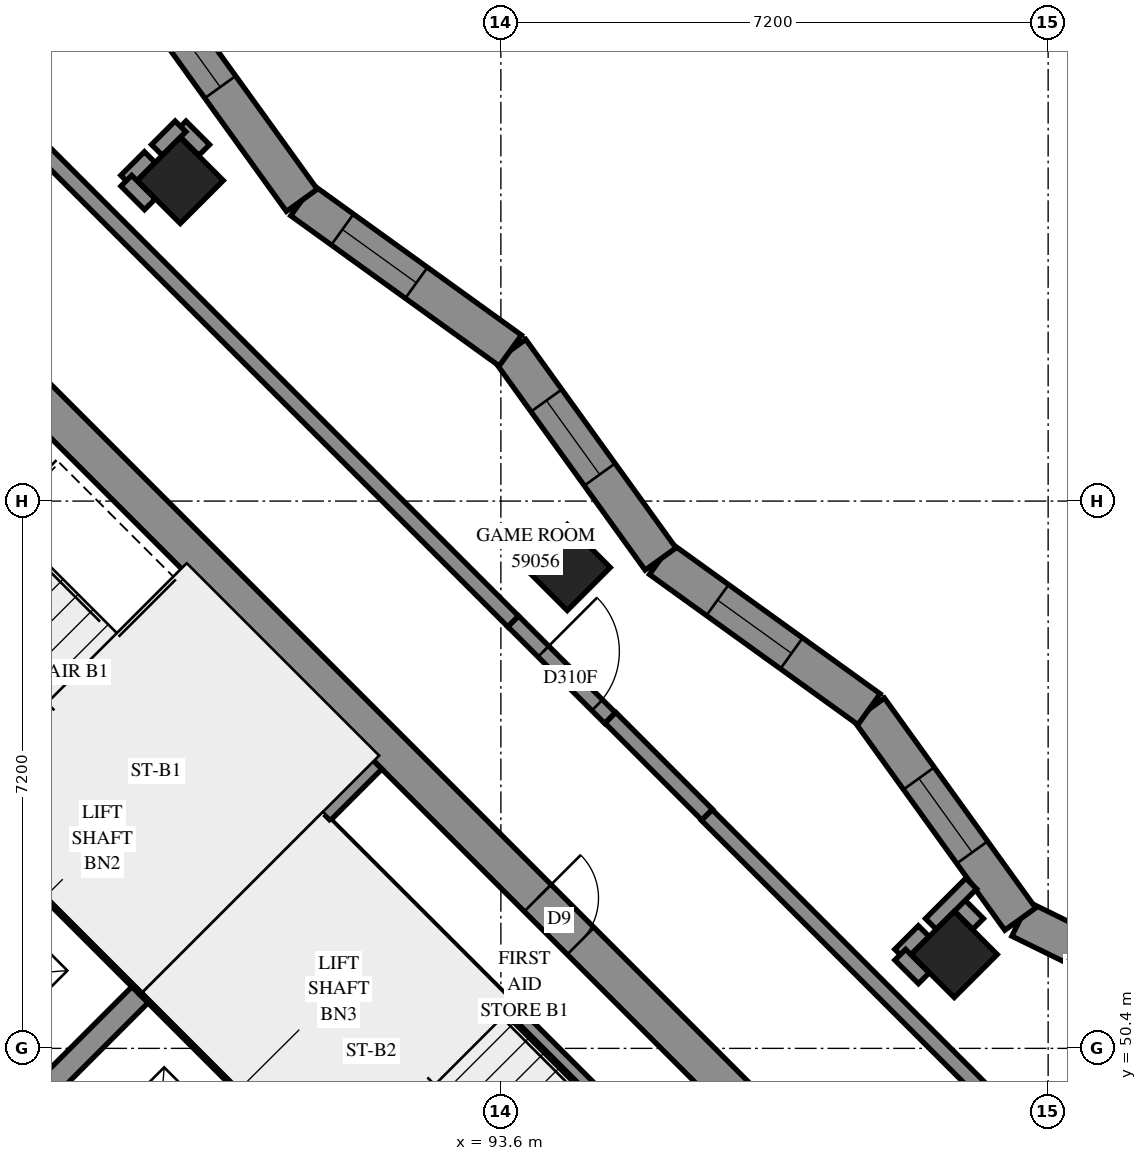
"""IFC4 building model, lengths in metres.
Left out: names, types, materials, properties, quantities, classifications, styles, units other than length and angle.
Written with IfcOpenShell. Run it as: python <this file> out.ifc"""

import sys

from ifc_helpers import new_model, si_unit, direction, frame, frame_2d, origin, origin_2d, place, context, subcontext, project, spatial, polyline, rectangle, outline, extrude, element, fill, save


model = new_model("IFC4")
c1 = context("Model", 3, precision=1e-05, world=origin(), true_north=direction((0.0, 1.0)))
c2 = subcontext(c1, "Body", "Model", "MODEL_VIEW")
j1 = project(units=[si_unit("LENGTHUNIT", "METRE"), si_unit("PLANEANGLEUNIT", "RADIAN")], contexts=[c1])
p1 = place(None, origin())
s1 = spatial("IfcSite", under=j1, at=p1, CompositionType="ELEMENT")
p2 = place(p1, origin())
s2 = spatial("IfcBuilding", under=s1, at=p2, CompositionType="ELEMENT")
p3 = place(p2, frame((0.0, 0.0, 216.8)))
s3 = spatial("IfcBuildingStorey", under=s2, at=p3, CompositionType="ELEMENT", Elevation=216.8)
for number, where, z_axis, x_axis in (
    (1, (89.382, 61.818, 0.0), (0.0, 0.0, 1.0), (0.707, -0.707, 0.0)),
    (2, (94.474, 56.727, 0.0), (0.0, 0.0, 1.0), (0.707, -0.707, 0.0)),
    (3, (99.565, 51.635, 0.0), (0.0, 0.0, 1.0), (0.707, -0.707, 0.0)),
):
    element("IfcColumn", number, at=place(p3, frame(where, z_axis=z_axis, x_axis=x_axis)), inside=s3, PredefinedType="COLUMN", context=c2, shape_type="SweptSolid", body=[
        extrude(rectangle(XDim=0.8, YDim=0.8, at=origin_2d()), origin(), (0.0, 0.0, 1.0), 3.1),
    ])
p4 = place(p3, frame((86.66, 59.802, -0.3), z_axis=(0.0, 0.0, 1.0), x_axis=(0.7071067812, -0.7071067812, 0.0)))
e4 = element("IfcWall", 4, at=p4, inside=s3, PredefinedType="SHEAR", context=c2, shape_type="SweptSolid", body=[
    extrude(rectangle(XDim=15.4, YDim=0.5, at=frame_2d((7.7, 0.0))), origin(), (0.0, 0.0, 1.0), 2.7),
])
p5 = place(p4, frame((10.5, 0.0, 0.3)))
e5 = element("IfcOpeningElement", 5, at=p5, cuts=e4, PredefinedType="OPENING", context=c2, shape_type="SweptSolid", body=[
    extrude(rectangle(XDim=0.8, YDim=2.1, at=frame_2d((0.4, 1.05))), frame((0.0, 0.26, 0.0), z_axis=(0.0, -1.0, 0.0), x_axis=(1.0, 0.0, 0.0)), (0.0, 0.0, 1.0), 0.52),
])
p6 = place(p3, frame((86.625, 48.878, 0.0), z_axis=(0.0, 0.0, 1.0), x_axis=(0.7071067812, 0.7071067812, 0.0)))
e6 = element("IfcWall", 6, at=p6, inside=s3, PredefinedType="SOLIDWALL", context=c2, shape_type="SweptSolid", body=[
    extrude(rectangle(XDim=3.3, YDim=0.3, at=frame_2d((1.65, 0.0))), origin(), (0.0, 0.0, 1.0), 3.1),
])
p7 = place(p3, frame((78.988, 51.423, 0.0), z_axis=(0.0, 0.0, 1.0), x_axis=(0.7071067812, -0.7071067812, 0.0)))
e7 = element("IfcWall", 7, at=p7, inside=s3, PredefinedType="SOLIDWALL", context=c2, shape_type="SweptSolid", body=[
    extrude(rectangle(XDim=14.4, YDim=0.3, at=frame_2d((7.2, 0.0))), origin(), (0.0, 0.0, 1.0), 3.1),
])
p8 = place(p7, frame((1.35, 0.0, 0.0)))
e8 = element("IfcOpeningElement", 8, at=p8, cuts=e7, PredefinedType="OPENING", context=c2, shape_type="SweptSolid", body=[
    extrude(rectangle(XDim=0.9, YDim=2.1, at=frame_2d((0.45, 1.05))), frame((0.0, 0.16, 0.0), z_axis=(0.0, -1.0, 0.0), x_axis=(1.0, 0.0, 0.0)), (0.0, 0.0, 1.0), 0.32),
])
p9 = place(p7, frame((4.95, 0.0, 0.0)))
e9 = element("IfcOpeningElement", 9, at=p9, cuts=e7, PredefinedType="OPENING", context=c2, shape_type="SweptSolid", body=[
    extrude(rectangle(XDim=0.9, YDim=2.1, at=frame_2d((0.45, 1.05))), frame((0.0, 0.16, 0.0), z_axis=(0.0, -1.0, 0.0), x_axis=(1.0, 0.0, 0.0)), (0.0, 0.0, 1.0), 0.32),
])
p10 = place(p7, frame((8.55, 0.0, 0.0)))
e10 = element("IfcOpeningElement", 10, at=p10, cuts=e7, PredefinedType="OPENING", context=c2, shape_type="SweptSolid", body=[
    extrude(rectangle(XDim=0.9, YDim=2.1, at=frame_2d((0.45, 1.05))), frame((0.0, 0.16, 0.0), z_axis=(0.0, -1.0, 0.0), x_axis=(1.0, 0.0, 0.0)), (0.0, 0.0, 1.0), 0.32),
])
p11 = place(p7, frame((12.05, 0.0, 0.0)))
e11 = element("IfcOpeningElement", 11, at=p11, cuts=e7, PredefinedType="OPENING", context=c2, shape_type="SweptSolid", body=[
    extrude(rectangle(XDim=1.1, YDim=2.1, at=frame_2d((0.55, 1.05))), frame((0.0, 0.16, 0.0), z_axis=(0.0, -1.0, 0.0), x_axis=(1.0, 0.0, 0.0)), (0.0, 0.0, 1.0), 0.32),
])
p12 = place(p3, frame((81.534, 53.969, 0.0), z_axis=(0.0, 0.0, 1.0), x_axis=(0.707103309, -0.7071102534, 0.0)))
e12 = element("IfcWall", 12, at=p12, inside=s3, PredefinedType="SOLIDWALL", context=c2, shape_type="SweptSolid", body=[
    extrude(rectangle(XDim=14.4, YDim=0.3, at=frame_2d((7.2, 0.0))), origin(), (0.0, 0.0, 1.0), 3.1),
])
p13 = place(p12, frame((1.25, 0.0, 0.0)))
e13 = element("IfcOpeningElement", 13, at=p13, cuts=e12, PredefinedType="OPENING", context=c2, shape_type="SweptSolid", body=[
    extrude(rectangle(XDim=1.1, YDim=2.1, at=frame_2d((0.55, 1.05))), frame((0.0, 0.16, 0.0), z_axis=(0.0, -1.0, 0.0), x_axis=(1.0, 0.0, 0.0)), (0.0, 0.0, 1.0), 0.32),
])
p14 = place(p12, frame((4.85, 0.0, 0.0)))
e14 = element("IfcOpeningElement", 14, at=p14, cuts=e12, PredefinedType="OPENING", context=c2, shape_type="SweptSolid", body=[
    extrude(rectangle(XDim=1.1, YDim=2.1, at=frame_2d((0.55, 1.05))), frame((0.0, 0.16, 0.0), z_axis=(0.0, -1.0, 0.0), x_axis=(1.0, 0.0, 0.0)), (0.0, 0.0, 1.0), 0.32),
])
p15 = place(p12, frame((8.45, 0.0, 0.0)))
e15 = element("IfcOpeningElement", 15, at=p15, cuts=e12, PredefinedType="OPENING", context=c2, shape_type="SweptSolid", body=[
    extrude(rectangle(XDim=1.1, YDim=2.1, at=frame_2d((0.55, 1.05))), frame((0.0, 0.16, 0.0), z_axis=(0.0, -1.0, 0.0), x_axis=(1.0, 0.0, 0.0)), (0.0, 0.0, 1.0), 0.32),
])
p16 = place(p12, frame((12.05, 0.0, 0.0)))
e16 = element("IfcOpeningElement", 16, at=p16, cuts=e12, PredefinedType="OPENING", context=c2, shape_type="SweptSolid", body=[
    extrude(rectangle(XDim=1.1, YDim=2.1, at=frame_2d((0.55, 1.05))), frame((0.0, 0.16, 0.0), z_axis=(0.0, -1.0, 0.0), x_axis=(1.0, 0.0, 0.0)), (0.0, 0.0, 1.0), 0.32),
])
for number, where, z_axis, x_axis in (
    (17, (83.867, 56.302, 0.0), (0.0, 0.0, 1.0), (0.707, -0.707, 0.0)),
    (18, (88.958, 51.211, 0.0), (0.0, 0.0, 1.0), (0.707, -0.707, 0.0)),
):
    element("IfcWall", number, at=place(p3, frame(where, z_axis=z_axis, x_axis=x_axis)), inside=s3, PredefinedType="SOLIDWALL", context=c2, shape_type="SweptSolid", body=[
        extrude(rectangle(XDim=7.2, YDim=0.3, at=frame_2d((3.6, 0.0))), origin(), (0.0, 0.0, 1.0), 3.1),
    ])
p17 = place(p3, frame((88.958, 51.211, 0.0), z_axis=(0.0, 0.0, 1.0), x_axis=(0.7071067812, 0.7071067812, 0.0)))
e19 = element("IfcWall", 19, at=p17, inside=s3, PredefinedType="SOLIDWALL", context=c2, shape_type="SweptSolid", body=[
    extrude(rectangle(XDim=4.2, YDim=0.3, at=frame_2d((2.1, 0.0))), origin(), (0.0, 0.0, 1.0), 3.1),
])
p18 = place(p3, frame((99.211, 46.544, 0.0), z_axis=(0.0, 0.0, 1.0), x_axis=(0.7071067812, 0.7071067812, 0.0)))
e20 = element("IfcWall", 20, at=p18, inside=s3, PredefinedType="SOLIDWALL", context=c2, shape_type="SweptSolid", body=[
    extrude(outline(polyline([(0.25, -0.25), (6.192, -0.25), (5.492, 0.25), (-0.25, 0.25), (0.25, -0.25)])), origin(), (0.0, 0.0, 1.0), 3.1),
])
p19 = place(p18, frame((0.925, 0.0, 0.6)))
e21 = element("IfcOpeningElement", 21, at=p19, cuts=e20, PredefinedType="OPENING", context=c2, shape_type="SweptSolid", body=[
    extrude(rectangle(XDim=1.8, YDim=1.9, at=frame_2d((0.9, 0.95))), frame((0.0, 0.26, 0.0), z_axis=(0.0, -1.0, 0.0), x_axis=(1.0, 0.0, 0.0)), (0.0, 0.0, 1.0), 0.52),
])
p20 = place(p18, frame((3.971, 0.0, 0.6)))
e22 = element("IfcOpeningElement", 22, at=p20, cuts=e20, PredefinedType="OPENING", context=c2, shape_type="SweptSolid", body=[
    extrude(rectangle(XDim=1.2, YDim=1.9, at=frame_2d((0.6, 0.95))), frame((0.0, 0.26, 0.0), z_axis=(0.0, -1.0, 0.0), x_axis=(1.0, 0.0, 0.0)), (0.0, 0.0, 1.0), 0.52),
])
p21 = place(p3, frame((103.342, 50.675, 0.0), z_axis=(0.0, 0.0, 1.0), x_axis=(-0.8979728607, 0.4400508396, 0.0)))
e23 = element("IfcWall", 23, at=p21, inside=s3, PredefinedType="SOLIDWALL", context=c2, shape_type="SweptSolid", body=[
    extrude(outline(polyline([(-0.35, -0.25), (3.177, -0.25), (3.302, 0.25), (0.35, 0.25), (-0.35, -0.25)])), origin(), (0.0, 0.0, 1.0), 3.1),
])
p22 = place(p21, frame((1.195, 0.0, 0.45)))
e24 = element("IfcOpeningElement", 24, at=p22, cuts=e23, PredefinedType="OPENING", context=c2, shape_type="SweptSolid", body=[
    extrude(rectangle(XDim=1.2, YDim=2.5, at=frame_2d((0.6, 1.25))), frame((0.0, 0.26, 0.0), z_axis=(0.0, -1.0, 0.0), x_axis=(1.0, 0.0, 0.0)), (0.0, 0.0, 1.0), 0.52),
])
p23 = place(p3, frame((100.433, 52.101, 0.0), z_axis=(0.0, 0.0, 1.0), x_axis=(-0.5845942373, 0.8113258148, 0.0)))
e25 = element("IfcWall", 25, at=p23, inside=s3, PredefinedType="SOLIDWALL", context=c2, shape_type="SweptSolid", body=[
    extrude(outline(polyline([(0.063, -0.25), (3.443, -0.25), (3.362, 0.25), (-0.063, 0.25), (0.063, -0.25)])), origin(), (0.0, 0.0, 1.0), 3.1),
])
p24 = place(p23, frame((1.081, 0.0, 0.45)))
e26 = element("IfcOpeningElement", 26, at=p24, cuts=e25, PredefinedType="OPENING", context=c2, shape_type="SweptSolid", body=[
    extrude(rectangle(XDim=1.2, YDim=2.5, at=frame_2d((0.6, 1.25))), frame((0.0, 0.26, 0.0), z_axis=(0.0, -1.0, 0.0), x_axis=(1.0, 0.0, 0.0)), (0.0, 0.0, 1.0), 0.52),
])
p25 = place(p3, frame((98.444, 54.862, 0.0), z_axis=(0.0, 0.0, 1.0), x_axis=(-0.8113121077, 0.5846132601, 0.0)))
e27 = element("IfcWall", 27, at=p25, inside=s3, PredefinedType="SOLIDWALL", context=c2, shape_type="SweptSolid", body=[
    extrude(outline(polyline([(-0.041, -0.25), (3.34, -0.25), (3.421, 0.25), (0.041, 0.25), (-0.041, -0.25)])), origin(), (0.0, 0.0, 1.0), 3.1),
])
p26 = place(p25, frame((1.257, 0.0, 0.45)))
e28 = element("IfcOpeningElement", 28, at=p26, cuts=e27, PredefinedType="OPENING", context=c2, shape_type="SweptSolid", body=[
    extrude(rectangle(XDim=1.2, YDim=2.5, at=frame_2d((0.6, 1.25))), frame((0.0, 0.26, 0.0), z_axis=(0.0, -1.0, 0.0), x_axis=(1.0, 0.0, 0.0)), (0.0, 0.0, 1.0), 0.52),
])
p27 = place(p3, frame((95.701, 56.838, 0.0), z_axis=(0.0, 0.0, 1.0), x_axis=(-0.5846132601, 0.8113121077, 0.0)))
e29 = element("IfcWall", 29, at=p27, inside=s3, PredefinedType="SOLIDWALL", context=c2, shape_type="SweptSolid", body=[
    extrude(outline(polyline([(0.041, -0.25), (3.421, -0.25), (3.34, 0.25), (-0.041, 0.25), (0.041, -0.25)])), origin(), (0.0, 0.0, 1.0), 3.1),
])
p28 = place(p27, frame((1.37, 0.0, 0.45)))
e30 = element("IfcOpeningElement", 30, at=p28, cuts=e29, PredefinedType="OPENING", context=c2, shape_type="SweptSolid", body=[
    extrude(rectangle(XDim=1.2, YDim=2.5, at=frame_2d((0.6, 1.25))), frame((0.0, 0.26, 0.0), z_axis=(0.0, -1.0, 0.0), x_axis=(1.0, 0.0, 0.0)), (0.0, 0.0, 1.0), 0.52),
])
p29 = place(p3, frame((93.725, 59.581, 0.0), z_axis=(0.0, 0.0, 1.0), x_axis=(-0.8113222169, 0.5845992306, 0.0)))
e31 = element("IfcWall", 31, at=p29, inside=s3, PredefinedType="SOLIDWALL", context=c2, shape_type="SweptSolid", body=[
    extrude(outline(polyline([(-0.041, -0.25), (3.34, -0.25), (3.421, 0.25), (0.041, 0.25), (-0.041, -0.25)])), origin(), (0.0, 0.0, 1.0), 3.1),
])
p30 = place(p29, frame((1.523, 0.0, 0.45)))
e32 = element("IfcOpeningElement", 32, at=p30, cuts=e31, PredefinedType="OPENING", context=c2, shape_type="SweptSolid", body=[
    extrude(rectangle(XDim=1.2, YDim=2.5, at=frame_2d((0.6, 1.25))), frame((0.0, 0.26, 0.0), z_axis=(0.0, -1.0, 0.0), x_axis=(1.0, 0.0, 0.0)), (0.0, 0.0, 1.0), 0.52),
])
p31 = place(p3, frame((90.982, 61.557, 0.0), z_axis=(0.0, 0.0, 1.0), x_axis=(-0.5845992306, 0.8113222169, 0.0)))
e33 = element("IfcWall", 33, at=p31, inside=s3, PredefinedType="SOLIDWALL", context=c2, shape_type="SweptSolid", body=[
    extrude(outline(polyline([(0.041, -0.25), (3.421, -0.25), (3.34, 0.25), (-0.041, 0.25), (0.041, -0.25)])), origin(), (0.0, 0.0, 1.0), 3.1),
])
p32 = place(p31, frame((1.836, 0.0, 0.45)))
e34 = element("IfcOpeningElement", 34, at=p32, cuts=e33, PredefinedType="OPENING", context=c2, shape_type="SweptSolid", body=[
    extrude(rectangle(XDim=1.2, YDim=2.5, at=frame_2d((0.6, 1.25))), frame((0.0, 0.26, 0.0), z_axis=(0.0, -1.0, 0.0), x_axis=(1.0, 0.0, 0.0)), (0.0, 0.0, 1.0), 0.52),
])
p33 = place(p3, frame((91.313, 53.354, 0.0), z_axis=(0.0, 0.0, 1.0), x_axis=(0.7071147811, -0.7070987812, 0.0)))
e35 = element("IfcWall", 35, at=p33, inside=s3, PredefinedType="PARTITIONING", context=c2, shape_type="SweptSolid", body=[
    extrude(rectangle(XDim=6.25, YDim=0.15, at=frame_2d((3.125, 0.0))), origin(), (0.0, 0.0, 1.0), 3.1),
])
p34 = place(p3, frame((86.835, 62.945, 0.0), z_axis=(0.0, 0.0, 1.0), x_axis=(0.7071067812, -0.7071067812, 0.0)))
e36 = element("IfcWall", 36, at=p34, inside=s3, PredefinedType="PARTITIONING", context=c2, shape_type="SweptSolid", body=[
    extrude(rectangle(XDim=9.798, YDim=0.2, at=frame_2d((4.899, 0.0))), origin(), (0.0, 0.0, 1.0), 3.1),
])
p35 = place(p3, frame((96.309, 53.471, 0.0), z_axis=(0.0, 0.0, 1.0), x_axis=(0.7071067812, -0.7071067812, 0.0)))
e37 = element("IfcWall", 37, at=p35, inside=s3, PredefinedType="PARTITIONING", context=c2, shape_type="SweptSolid", body=[
    extrude(rectangle(XDim=6.2, YDim=0.2, at=frame_2d((3.1, 0.0))), origin(), (0.0, 0.0, 1.0), 3.1),
])
p36 = place(p3, frame((93.763, 56.017, 0.0), z_axis=(0.0, 0.0, 1.0), x_axis=(0.7076620277, -0.7065510983, 0.0)))
e38 = element("IfcWall", 38, at=p36, inside=s3, PredefinedType="PARTITIONING", context=c2, shape_type="SweptSolid", body=[
    extrude(rectangle(XDim=1.8, YDim=0.2, at=frame_2d((0.9, 0.0))), origin(), (0.0, 0.0, 1.0), 3.1),
])
p37 = place(p36, frame((0.559, 0.0, 0.0)))
e39 = element("IfcOpeningElement", 39, at=p37, cuts=e38, PredefinedType="OPENING", context=c2, shape_type="SweptSolid", body=[
    extrude(rectangle(XDim=1.0, YDim=2.1, at=frame_2d((0.5, 1.05))), frame((0.0, 0.11, 0.0), z_axis=(0.0, -1.0, 0.0), x_axis=(1.0, 0.0, 0.0)), (0.0, 0.0, 1.0), 0.22),
])
p38 = place(p3, frame((95.041, 54.749, 0.0), z_axis=(0.0, 0.0, 1.0), x_axis=(0.7065510983, -0.7076620277, 0.0)))
e40 = element("IfcWall", 40, at=p38, inside=s3, PredefinedType="PARTITIONING", context=c2, shape_type="SweptSolid", body=[
    extrude(rectangle(XDim=1.8, YDim=0.2, at=frame_2d((0.9, 0.0))), origin(), (0.0, 0.0, 1.0), 3.1),
])
for number, where, z_axis, x_axis in (
    (41, (98.853, 51.633, 0.0), (0.0, 0.0, 1.0), (0.707, 0.707, 0.0)),
    (42, (88.671, 61.815, 0.0), (0.0, 0.0, 1.0), (0.707, 0.707, 0.0)),
    (43, (88.672, 61.814, 0.0), (0.0, 0.0, 1.0), (0.707, -0.707, 0.0)),
    (44, (98.854, 51.632, 0.0), (0.0, 0.0, 1.0), (0.707, -0.707, 0.0)),
    (45, (99.568, 52.346, 0.0), (0.0, 0.0, 1.0), (0.707, -0.707, 0.0)),
    (46, (89.386, 62.528, 0.0), (0.0, 0.0, 1.0), (0.707, -0.707, 0.0)),
    (47, (89.075, 62.219, 0.0), (0.0, 0.0, 1.0), (0.707, 0.707, 0.0)),
):
    element("IfcWall", number, at=place(p3, frame(where, z_axis=z_axis, x_axis=x_axis)), inside=s3, PredefinedType="PARTITIONING", context=c2, shape_type="SweptSolid", body=[
        extrude(rectangle(XDim=0.438, YDim=0.2, at=frame_2d((0.219, 0.0))), origin(), (0.0, 0.0, 1.0), 3.1),
    ])
p39 = place(p3, frame((99.257, 52.037, 0.0), z_axis=(0.0, 0.0, 1.0), x_axis=(0.7071067812, 0.7071067812, 0.0)))
e48 = element("IfcWall", 48, at=p39, inside=s3, PredefinedType="PARTITIONING", context=c2, shape_type="SweptSolid", body=[
    extrude(rectangle(XDim=0.751, YDim=0.2, at=frame_2d((0.376, 0.0))), origin(), (0.0, 0.0, 1.0), 3.1),
])
p40 = place(p24, origin())
e49 = element("IfcWindow", 49, at=p40, inside=s3, PartitioningType="SINGLE_PANEL", PredefinedType="WINDOW", context=c2, shape_type="SweptSolid", body=[
    extrude(rectangle(XDim=1.2, YDim=2.5, at=frame_2d((0.6, 1.25))), frame((0.0, 0.18, 0.0), z_axis=(0.0, -1.0, 0.0), x_axis=(1.0, 0.0, 0.0)), (0.0, 0.0, 1.0), 0.06),
])
fill(e26, e49)
p41 = place(p26, origin())
e50 = element("IfcWindow", 50, at=p41, inside=s3, PartitioningType="SINGLE_PANEL", PredefinedType="WINDOW", context=c2, shape_type="SweptSolid", body=[
    extrude(rectangle(XDim=1.2, YDim=2.5, at=frame_2d((0.6, 1.25))), frame((0.0, 0.18, 0.0), z_axis=(0.0, -1.0, 0.0), x_axis=(1.0, 0.0, 0.0)), (0.0, 0.0, 1.0), 0.06),
])
fill(e28, e50)
p42 = place(p28, origin())
e51 = element("IfcWindow", 51, at=p42, inside=s3, PartitioningType="SINGLE_PANEL", PredefinedType="WINDOW", context=c2, shape_type="SweptSolid", body=[
    extrude(rectangle(XDim=1.2, YDim=2.5, at=frame_2d((0.6, 1.25))), frame((0.0, 0.18, 0.0), z_axis=(0.0, -1.0, 0.0), x_axis=(1.0, 0.0, 0.0)), (0.0, 0.0, 1.0), 0.06),
])
fill(e30, e51)
p43 = place(p30, origin())
e52 = element("IfcWindow", 52, at=p43, inside=s3, PartitioningType="SINGLE_PANEL", PredefinedType="WINDOW", context=c2, shape_type="SweptSolid", body=[
    extrude(rectangle(XDim=1.2, YDim=2.5, at=frame_2d((0.6, 1.25))), frame((0.0, 0.18, 0.0), z_axis=(0.0, -1.0, 0.0), x_axis=(1.0, 0.0, 0.0)), (0.0, 0.0, 1.0), 0.06),
])
fill(e32, e52)
p44 = place(p32, origin())
e53 = element("IfcWindow", 53, at=p44, inside=s3, PartitioningType="SINGLE_PANEL", PredefinedType="WINDOW", context=c2, shape_type="SweptSolid", body=[
    extrude(rectangle(XDim=1.2, YDim=2.5, at=frame_2d((0.6, 1.25))), frame((0.0, 0.18, 0.0), z_axis=(0.0, -1.0, 0.0), x_axis=(1.0, 0.0, 0.0)), (0.0, 0.0, 1.0), 0.06),
])
fill(e34, e53)
p45 = place(p5, origin())
e54 = element("IfcDoor", 54, at=p45, inside=s3, OperationType="SINGLE_SWING_RIGHT", PredefinedType="DOOR", context=c2, shape_type="SweptSolid", body=[
    extrude(rectangle(XDim=0.8, YDim=2.1, at=frame_2d((0.4, 1.05))), frame((0.0, 0.025, 0.0), z_axis=(0.0, -1.0, 0.0), x_axis=(1.0, 0.0, 0.0)), (0.0, 0.0, 1.0), 0.05),
])
fill(e5, e54)
p46 = place(p37, origin())
e55 = element("IfcDoor", 55, at=p46, inside=s3, OperationType="SINGLE_SWING_LEFT", PredefinedType="DOOR", context=c2, shape_type="SweptSolid", body=[
    extrude(rectangle(XDim=1.0, YDim=2.1, at=frame_2d((0.5, 1.05))), frame((0.0, 0.025, 0.0), z_axis=(0.0, -1.0, 0.0), x_axis=(1.0, 0.0, 0.0)), (0.0, 0.0, 1.0), 0.05),
])
fill(e39, e55)
save(model, sys.argv[1])
